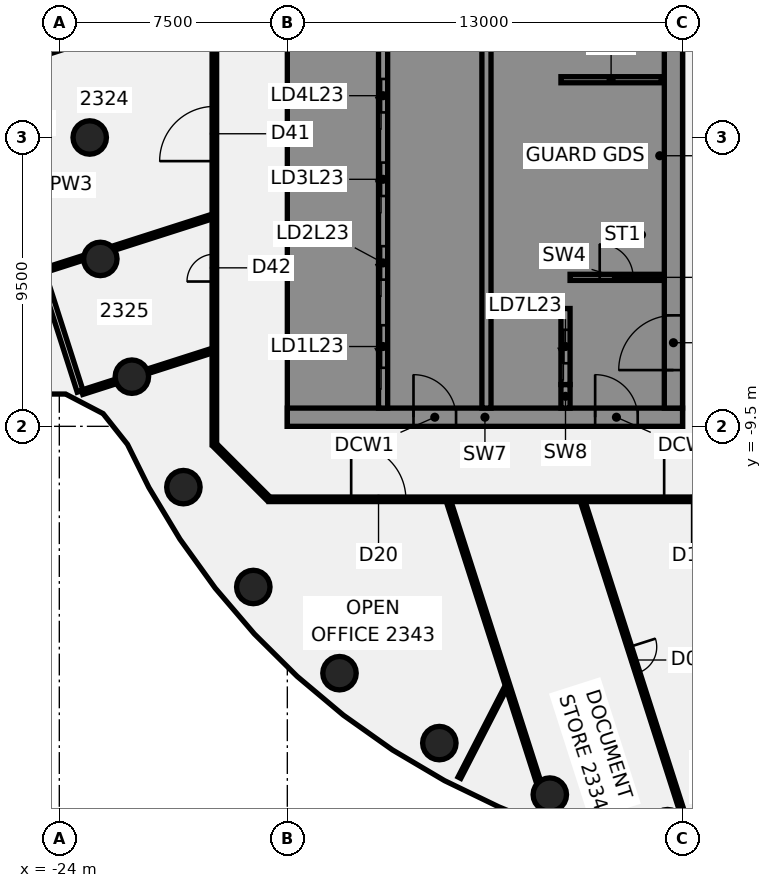
"""IFC4 building model, lengths in metres.
Left out: names, types, materials, properties, quantities, classifications, styles, units other than length and angle.
Written with IfcOpenShell. Run it as: python <this file> out.ifc"""

import sys

from ifc_helpers import new_model, si_unit, direction, frame, frame_2d, origin, origin_2d, place, context, subcontext, project, spatial, polyline, rectangle, circle, outline, extrude, element, fill, save


model = new_model("IFC4")
c1 = context("Model", 3, precision=1e-05, world=origin(), true_north=direction((0.0, 1.0)))
c2 = subcontext(c1, "Body", "Model", "MODEL_VIEW")
j1 = project(units=[si_unit("LENGTHUNIT", "METRE"), si_unit("PLANEANGLEUNIT", "RADIAN")], contexts=[c1])
p1 = place(None, origin())
s1 = spatial("IfcSite", under=j1, at=p1, CompositionType="ELEMENT")
p2 = place(p1, origin())
s2 = spatial("IfcBuilding", under=s1, at=p2, CompositionType="ELEMENT")
p3 = place(p2, frame((0.0, 0.0, 98.5)))
s3 = spatial("IfcBuildingStorey", under=s2, at=p3, CompositionType="ELEMENT", Elevation=98.5)
for number, where, z_axis, x_axis in (
    (1, (-23.0, 0.0, -0.14), (0.0, 0.0, 1.0), (1.0, 0.0, 0.0)),
    (2, (-22.651, -3.994, -0.14), (0.0, 0.0, 1.0), (1.0, 0.0, 0.0)),
    (3, (-21.613, -7.866, -0.14), (0.0, 0.0, 1.0), (1.0, 0.0, 0.0)),
    (4, (-19.919, -11.5, -0.14), (0.0, 0.0, 1.0), (1.0, 0.0, 0.0)),
    (5, (-17.619, -14.784, -0.14), (0.0, 0.0, 1.0), (1.0, 0.0, 0.0)),
    (6, (-14.784, -17.619, -0.14), (0.0, 0.0, 1.0), (1.0, 0.0, 0.0)),
    (7, (-11.5, -19.919, -0.14), (0.0, 0.0, 1.0), (1.0, 0.0, 0.0)),
    (8, (-7.866, -21.613, -0.14), (0.0, 0.0, 1.0), (1.0, 0.0, 0.0)),
):
    element("IfcColumn", number, at=place(p3, frame(where, z_axis=z_axis, x_axis=x_axis)), inside=s3, PredefinedType="COLUMN", context=c2, shape_type="SweptSolid", body=[
        extrude(circle(Radius=0.55, at=origin_2d()), origin(), (0.0, 0.0, 1.0), 3.75),
    ])
p4 = place(p3, frame((-27.663, 5.22, 0.0), z_axis=(0.0, 0.0, 1.0), x_axis=(0.305127633137, -0.952311465591, 0.0)))
e9 = element("IfcWall", 9, at=p4, inside=s3, PredefinedType="PARTITIONING", context=c2, shape_type="SweptSolid", body=[
    extrude(rectangle(XDim=14.247, YDim=0.2, at=frame_2d((7.124, 0.0))), origin(), (0.0, 0.0, 1.0), 3.01),
])
p5 = place(p4, frame((6.099, 0.0, 0.0)))
e10 = element("IfcOpeningElement", 10, at=p5, cuts=e9, PredefinedType="OPENING", context=c2, shape_type="SweptSolid", body=[
    extrude(rectangle(XDim=1.4, YDim=2.1, at=frame_2d((0.7, 1.05))), frame((0.0, 0.11, 0.0), z_axis=(0.0, -1.0, 0.0), x_axis=(1.0, 0.0, 0.0)), (0.0, 0.0, 1.0), 0.22),
])
p6 = place(p3, frame((-11.19, -11.981, 0.0), z_axis=(0.0, 0.0, 1.0), x_axis=(0.305161297435, -0.952300678645, 0.0)))
e11 = element("IfcWall", 11, at=p6, inside=s3, PredefinedType="PARTITIONING", context=c2, shape_type="SweptSolid", body=[
    extrude(rectangle(XDim=9.695, YDim=0.15, at=frame_2d((4.847, 0.0))), origin(), (0.0, 0.0, 1.0), 3.01),
])
p7 = place(p3, frame((-6.779, -11.981, 0.0), z_axis=(0.0, 0.0, 1.0), x_axis=(0.305006015104, -0.952350424345, 0.0)))
e12 = element("IfcWall", 12, at=p7, inside=s3, PredefinedType="PARTITIONING", context=c2, shape_type="SweptSolid", body=[
    extrude(rectangle(XDim=15.309, YDim=0.15, at=frame_2d((7.655, 0.0))), origin(), (0.0, 0.0, 1.0), 3.01),
])
p8 = place(p7, frame((5.015, 0.0, 0.0)))
e13 = element("IfcOpeningElement", 13, at=p8, cuts=e12, PredefinedType="OPENING", context=c2, shape_type="SweptSolid", body=[
    extrude(rectangle(XDim=0.9, YDim=2.1, at=frame_2d((0.45, 1.05))), frame((0.0, 0.085, 0.0), z_axis=(0.0, -1.0, 0.0), x_axis=(1.0, 0.0, 0.0)), (0.0, 0.0, 1.0), 0.17),
])
p9 = place(p3, frame((-18.872, -10.128, 0.0), z_axis=(0.0, 0.0, 1.0), x_axis=(0.707106781187, -0.707106781187, 0.0)))
e14 = element("IfcWall", 14, at=p9, inside=s3, PredefinedType="PARTITIONING", context=c2, shape_type="SweptSolid", body=[
    extrude(rectangle(XDim=2.465, YDim=0.15, at=frame_2d((1.232, 0.0))), origin(), (0.0, 0.0, 1.0), 3.01),
])
p10 = place(p3, frame((-17.1, -11.9, 0.0), z_axis=(0.0, 0.0, 1.0), x_axis=(1.0, 0.0, 0.0)))
e15 = element("IfcWall", 15, at=p10, inside=s3, PredefinedType="PARTITIONING", context=c2, shape_type="SweptSolid", body=[
    extrude(rectangle(XDim=34.165, YDim=0.15, at=frame_2d((17.083, 0.0))), origin(), (0.0, 0.0, 1.0), 3.01),
])
p11 = place(p10, frame((12.995, 0.0, 0.0)))
e16 = element("IfcOpeningElement", 16, at=p11, cuts=e15, PredefinedType="OPENING", context=c2, shape_type="SweptSolid", body=[
    extrude(rectangle(XDim=1.8, YDim=2.1, at=frame_2d((0.9, 1.05))), frame((0.0, 0.085, 0.0), z_axis=(0.0, -1.0, 0.0), x_axis=(1.0, 0.0, 0.0)), (0.0, 0.0, 1.0), 0.17),
])
p12 = place(p10, frame((2.7, 0.0, 0.0)))
e17 = element("IfcOpeningElement", 17, at=p12, cuts=e15, PredefinedType="OPENING", context=c2, shape_type="SweptSolid", body=[
    extrude(rectangle(XDim=1.8, YDim=2.1, at=frame_2d((0.9, 1.05))), frame((0.0, 0.085, 0.0), z_axis=(0.0, -1.0, 0.0), x_axis=(1.0, 0.0, 0.0)), (0.0, 0.0, 1.0), 0.17),
])
p13 = place(p10, frame((27.095, 0.0, 0.0)))
e18 = element("IfcOpeningElement", 18, at=p13, cuts=e15, PredefinedType="OPENING", context=c2, shape_type="SweptSolid", body=[
    extrude(rectangle(XDim=1.8, YDim=2.1, at=frame_2d((0.9, 1.05))), frame((0.0, 0.085, 0.0), z_axis=(0.0, -1.0, 0.0), x_axis=(1.0, 0.0, 0.0)), (0.0, 0.0, 1.0), 0.17),
])
p14 = place(p3, frame((-26.561, 2.11, 0.0), z_axis=(0.0, 0.0, 1.0), x_axis=(0.952353244945, 0.304997207926, 0.0)))
e19 = element("IfcWall", 19, at=p14, inside=s3, PredefinedType="PARTITIONING", context=c2, shape_type="SweptSolid", body=[
    extrude(rectangle(XDim=7.959, YDim=0.15, at=frame_2d((3.979, 0.0))), origin(), (0.0, 0.0, 1.0), 3.01),
])
p15 = place(p14, frame((2.45, 0.0, 0.0)))
e20 = element("IfcOpeningElement", 20, at=p15, cuts=e19, PredefinedType="OPENING", context=c2, shape_type="SweptSolid", body=[
    extrude(rectangle(XDim=0.9, YDim=2.1, at=frame_2d((0.45, 1.05))), frame((0.0, 0.085, 0.0), z_axis=(0.0, -1.0, 0.0), x_axis=(1.0, 0.0, 0.0)), (0.0, 0.0, 1.0), 0.17),
])
p16 = place(p3, frame((-24.482, -4.365, 0.0), z_axis=(0.0, 0.0, 1.0), x_axis=(0.952335663156, 0.305052101586, 0.0)))
e21 = element("IfcWall", 21, at=p16, inside=s3, PredefinedType="PARTITIONING", context=c2, shape_type="SweptSolid", body=[
    extrude(rectangle(XDim=1.346, YDim=0.15, at=frame_2d((0.673, 0.0))), origin(), (0.0, 0.0, 1.0), 3.01),
])
p17 = place(p3, frame((-22.235, -3.645, 0.0), z_axis=(0.0, 0.0, 1.0), x_axis=(0.952333666631, 0.305058334423, 0.0)))
e22 = element("IfcWall", 22, at=p17, inside=s3, PredefinedType="PARTITIONING", context=c2, shape_type="SweptSolid", body=[
    extrude(rectangle(XDim=3.417, YDim=0.15, at=frame_2d((1.708, 0.0))), origin(), (0.0, 0.0, 1.0), 3.01),
])
p18 = place(p3, frame((-23.251, -8.381, 0.0), z_axis=(0.0, 0.0, 1.0), x_axis=(0.952293891568, 0.305182476696, 0.0)))
e23 = element("IfcWall", 23, at=p18, inside=s3, PredefinedType="PARTITIONING", context=c2, shape_type="SweptSolid", body=[
    extrude(rectangle(XDim=1.176, YDim=0.15, at=frame_2d((0.588, 0.0))), origin(), (0.0, 0.0, 1.0), 3.01),
])
p19 = place(p3, frame((-21.1, -7.692, 0.0), z_axis=(0.0, 0.0, 1.0), x_axis=(0.952337472226, 0.30504645383, 0.0)))
e24 = element("IfcWall", 24, at=p19, inside=s3, PredefinedType="PARTITIONING", context=c2, shape_type="SweptSolid", body=[
    extrude(rectangle(XDim=2.225, YDim=0.15, at=frame_2d((1.112, 0.0))), origin(), (0.0, 0.0, 1.0), 3.01),
])
p20 = place(p3, frame((-10.838, -21.056, 0.0), z_axis=(0.0, 0.0, 1.0), x_axis=(0.457634850464, 0.889140227209, 0.0)))
e25 = element("IfcWall", 25, at=p20, inside=s3, PredefinedType="PARTITIONING", context=c2, shape_type="SweptSolid", body=[
    extrude(rectangle(XDim=3.308, YDim=0.1, at=frame_2d((1.654, 0.0))), origin(), (0.0, 0.0, 1.0), 3.01),
])
p21 = place(p3, frame((-18.9, -10.1, 0.0), z_axis=(0.0, 0.0, 1.0), x_axis=(0.0, 1.0, 0.0)))
e26 = element("IfcWall", 26, at=p21, inside=s3, PredefinedType="PARTITIONING", context=c2, shape_type="SweptSolid", body=[
    extrude(rectangle(XDim=20.2, YDim=0.15, at=frame_2d((10.1, 0.0))), origin(), (0.0, 0.0, 1.0), 3.01),
])
p22 = place(p21, frame((9.323, 0.0, 0.0)))
e27 = element("IfcOpeningElement", 27, at=p22, cuts=e26, PredefinedType="OPENING", context=c2, shape_type="SweptSolid", body=[
    extrude(rectangle(XDim=1.8, YDim=2.1, at=frame_2d((0.9, 1.05))), frame((0.0, 0.085, 0.0), z_axis=(0.0, -1.0, 0.0), x_axis=(1.0, 0.0, 0.0)), (0.0, 0.0, 1.0), 0.17),
])
p23 = place(p21, frame((5.363, 0.0, 0.0)))
e28 = element("IfcOpeningElement", 28, at=p23, cuts=e26, PredefinedType="OPENING", context=c2, shape_type="SweptSolid", body=[
    extrude(rectangle(XDim=0.9, YDim=2.1, at=frame_2d((0.45, 1.05))), frame((0.0, 0.085, 0.0), z_axis=(0.0, -1.0, 0.0), x_axis=(1.0, 0.0, 0.0)), (0.0, 0.0, 1.0), 0.17),
])
p24 = place(p3, frame((-16.5, -9.2, 0.0), z_axis=(0.0, 0.0, 1.0), x_axis=(1.0, 0.0, 0.0)))
e29 = element("IfcWall", 29, at=p24, inside=s3, PredefinedType="SHEAR", context=c2, shape_type="SweptSolid", body=[
    extrude(rectangle(XDim=13.0, YDim=0.6, at=frame_2d((6.5, 0.0))), origin(), (0.0, 0.0, 1.0), 3.61),
])
p25 = place(p24, frame((4.15, 0.0, 0.0)))
e30 = element("IfcOpeningElement", 30, at=p25, cuts=e29, PredefinedType="OPENING", context=c2, shape_type="SweptSolid", body=[
    extrude(rectangle(XDim=1.4, YDim=2.1, at=frame_2d((0.7, 1.05))), frame((0.0, 0.31, 0.0), z_axis=(0.0, -1.0, 0.0), x_axis=(1.0, 0.0, 0.0)), (0.0, 0.0, 1.0), 0.62),
])
p26 = place(p24, frame((10.125, 0.0, 0.0)))
e31 = element("IfcOpeningElement", 31, at=p26, cuts=e29, PredefinedType="OPENING", context=c2, shape_type="SweptSolid", body=[
    extrude(rectangle(XDim=1.4, YDim=2.1, at=frame_2d((0.7, 1.05))), frame((0.0, 0.31, 0.0), z_axis=(0.0, -1.0, 0.0), x_axis=(1.0, 0.0, 0.0)), (0.0, 0.0, 1.0), 0.62),
])
p27 = place(p3, origin())
e32 = element("IfcWall", 32, at=p27, inside=s3, PredefinedType="SHEAR", context=c2, shape_type="SweptSolid", body=[
    extrude(outline(polyline([(-13.5, -8.9), (-13.5, -8.125), (-15.9, -8.125), (-15.9, -5.625), (-13.5, -5.625), (-13.5, -5.375), (-15.9, -5.375), (-15.9, -2.875), (-13.5, -2.875), (-13.5, -2.625), (-15.9, -2.625), (-15.9, -0.125), (-13.5, -0.125), (-13.5, 0.125), (-15.9, 0.125), (-15.9, 2.625), (-13.5, 2.625), (-13.5, 2.875), (-15.9, 2.875), (-15.9, 5.375), (-13.5, 5.375), (-13.5, 5.625), (-15.9, 5.625), (-15.9, 8.125), (-13.5, 8.125), (-13.5, 8.9), (-15.9, 8.9), (-16.5, 8.9), (-16.5, -8.9), (-15.9, -8.9), (-13.5, -8.9)])), origin(), (0.0, 0.0, 1.0), 3.61),
])
p28 = place(p3, origin())
e33 = element("IfcWall", 33, at=p28, inside=s3, PredefinedType="SHEAR", context=c2, shape_type="SweptSolid", body=[
    extrude(outline(polyline([(-9.8, -5.375), (-9.8, -5.625), (-7.5, -5.625), (-7.2, -5.625), (-7.2, 8.9), (-7.5, 8.9), (-9.8, 8.9), (-9.8, 8.125), (-7.5, 8.125), (-7.5, 5.625), (-9.8, 5.625), (-9.8, 5.375), (-7.5, 5.375), (-7.5, 2.875), (-9.8, 2.875), (-9.8, 2.625), (-7.5, 2.625), (-7.5, 0.125), (-9.8, 0.125), (-9.8, -0.125), (-7.5, -0.125), (-7.5, -2.625), (-9.8, -2.625), (-9.8, -2.875), (-7.5, -2.875), (-7.5, -5.375), (-9.8, -5.375)])), origin(), (0.0, 0.0, 1.0), 3.61),
])
p29 = place(p3, origin())
e34 = element("IfcWall", 34, at=p29, inside=s3, PredefinedType="SHEAR", context=c2, shape_type="SweptSolid", body=[
    extrude(outline(polyline([(-7.5, -8.125), (-9.55, -8.125), (-9.55, -5.625), (-9.8, -5.625), (-9.8, -8.125), (-9.8, -8.9), (-7.5, -8.9), (-7.5, -8.125)])), origin(), (0.0, 0.0, 1.0), 3.61),
])
p30 = place(p3, frame((-7.35, -8.9, 0.0), z_axis=(0.0, 0.0, 1.0), x_axis=(0.0, 1.0, 0.0)))
e35 = element("IfcWall", 35, at=p30, inside=s3, PredefinedType="SHEAR", context=c2, shape_type="SweptSolid", body=[
    extrude(rectangle(XDim=0.775, YDim=0.3, at=frame_2d((0.387, 0.0))), origin(), (0.0, 0.0, 1.0), 3.61),
])
p31 = place(p3, frame((-7.5, 1.9, 0.0), z_axis=(0.0, 0.0, 1.0), x_axis=(1.0, 0.0, 0.0)))
e36 = element("IfcWall", 36, at=p31, inside=s3, PredefinedType="SHEAR", context=c2, shape_type="SweptSolid", body=[
    extrude(rectangle(XDim=3.3, YDim=0.2, at=frame_2d((1.65, 0.0))), origin(), (0.0, 0.0, 1.0), 3.61),
])
p32 = place(p3, frame((-13.35, -8.9, 0.0), z_axis=(0.0, 0.0, 1.0), x_axis=(0.0, 1.0, 0.0)))
e37 = element("IfcWall", 37, at=p32, inside=s3, PredefinedType="SHEAR", context=c2, shape_type="SweptSolid", body=[
    extrude(rectangle(XDim=17.8, YDim=0.3, at=frame_2d((8.9, 0.0))), origin(), (0.0, 0.0, 1.0), 3.61),
])
p33 = place(p32, frame((1.325, 0.0, 0.0)))
e38 = element("IfcOpeningElement", 38, at=p33, cuts=e37, PredefinedType="OPENING", context=c2, shape_type="SweptSolid", body=[
    extrude(rectangle(XDim=1.4, YDim=2.1, at=frame_2d((0.7, 1.05))), frame((0.0, 0.16, 0.0), z_axis=(0.0, -1.0, 0.0), x_axis=(1.0, 0.0, 0.0)), (0.0, 0.0, 1.0), 0.32),
])
p34 = place(p32, frame((4.225, 0.0, 0.0)))
e39 = element("IfcOpeningElement", 39, at=p34, cuts=e37, PredefinedType="OPENING", context=c2, shape_type="SweptSolid", body=[
    extrude(rectangle(XDim=1.1, YDim=2.1, at=frame_2d((0.55, 1.05))), frame((0.0, 0.16, 0.0), z_axis=(0.0, -1.0, 0.0), x_axis=(1.0, 0.0, 0.0)), (0.0, 0.0, 1.0), 0.32),
])
p35 = place(p32, frame((6.975, 0.0, 0.0)))
e40 = element("IfcOpeningElement", 40, at=p35, cuts=e37, PredefinedType="OPENING", context=c2, shape_type="SweptSolid", body=[
    extrude(rectangle(XDim=1.1, YDim=2.1, at=frame_2d((0.55, 1.05))), frame((0.0, 0.16, 0.0), z_axis=(0.0, -1.0, 0.0), x_axis=(1.0, 0.0, 0.0)), (0.0, 0.0, 1.0), 0.32),
])
p36 = place(p32, frame((9.725, 0.0, 0.0)))
e41 = element("IfcOpeningElement", 41, at=p36, cuts=e37, PredefinedType="OPENING", context=c2, shape_type="SweptSolid", body=[
    extrude(rectangle(XDim=1.1, YDim=2.1, at=frame_2d((0.55, 1.05))), frame((0.0, 0.16, 0.0), z_axis=(0.0, -1.0, 0.0), x_axis=(1.0, 0.0, 0.0)), (0.0, 0.0, 1.0), 0.32),
])
p37 = place(p32, frame((12.475, 0.0, 0.0)))
e42 = element("IfcOpeningElement", 42, at=p37, cuts=e37, PredefinedType="OPENING", context=c2, shape_type="SweptSolid", body=[
    extrude(rectangle(XDim=1.1, YDim=2.1, at=frame_2d((0.55, 1.05))), frame((0.0, 0.16, 0.0), z_axis=(0.0, -1.0, 0.0), x_axis=(1.0, 0.0, 0.0)), (0.0, 0.0, 1.0), 0.32),
])
p38 = place(p3, frame((-9.95, -8.9, 0.0), z_axis=(0.0, 0.0, 1.0), x_axis=(0.0, 1.0, 0.0)))
e43 = element("IfcWall", 43, at=p38, inside=s3, PredefinedType="SHEAR", context=c2, shape_type="SweptSolid", body=[
    extrude(rectangle(XDim=17.8, YDim=0.3, at=frame_2d((8.9, 0.0))), origin(), (0.0, 0.0, 1.0), 3.61),
])
p39 = place(p3, frame((-7.35, -8.125, 0.0), z_axis=(0.0, 0.0, 1.0), x_axis=(0.0, 1.0, 0.0)))
e44 = element("IfcWall", 44, at=p39, inside=s3, PredefinedType="SHEAR", context=c2, shape_type="SweptSolid", body=[
    extrude(rectangle(XDim=2.5, YDim=0.3, at=frame_2d((1.25, 0.0))), origin(), (0.0, 0.0, 1.0), 3.61),
])
p40 = place(p39, frame((0.7, 0.0, 0.0)))
e45 = element("IfcOpeningElement", 45, at=p40, cuts=e44, PredefinedType="OPENING", context=c2, shape_type="SweptSolid", body=[
    extrude(rectangle(XDim=1.1, YDim=2.1, at=frame_2d((0.55, 1.05))), frame((0.0, 0.16, 0.0), z_axis=(0.0, -1.0, 0.0), x_axis=(1.0, 0.0, 0.0)), (0.0, 0.0, 1.0), 0.32),
])
p41 = place(p3, frame((-3.8, -8.9, 0.0), z_axis=(0.0, 0.0, 1.0), x_axis=(0.0, 1.0, 0.0)))
e46 = element("IfcWall", 46, at=p41, inside=s3, PredefinedType="SHEAR", context=c2, shape_type="SweptSolid", body=[
    extrude(rectangle(XDim=17.8, YDim=0.6, at=frame_2d((8.9, 0.0))), origin(), (0.0, 0.0, 1.0), 3.61),
])
p42 = place(p41, frame((1.25, 0.0, 0.0)))
e47 = element("IfcOpeningElement", 47, at=p42, cuts=e46, PredefinedType="OPENING", context=c2, shape_type="SweptSolid", body=[
    extrude(rectangle(XDim=1.8, YDim=2.1, at=frame_2d((0.9, 1.05))), frame((0.0, 0.31, 0.0), z_axis=(0.0, -1.0, 0.0), x_axis=(1.0, 0.0, 0.0)), (0.0, 0.0, 1.0), 0.62),
])
p43 = place(p41, frame((13.8, 0.0, 0.0)))
e48 = element("IfcOpeningElement", 48, at=p43, cuts=e46, PredefinedType="OPENING", context=c2, shape_type="SweptSolid", body=[
    extrude(rectangle(XDim=1.0, YDim=2.1, at=frame_2d((0.5, 1.05))), frame((0.0, 0.31, 0.0), z_axis=(0.0, -1.0, 0.0), x_axis=(1.0, 0.0, 0.0)), (0.0, 0.0, 1.0), 0.62),
])
p44 = place(p3, frame((-7.2, -4.6, 0.0), z_axis=(0.0, 0.0, 1.0), x_axis=(1.0, 0.0, 0.0)))
e49 = element("IfcWall", 49, at=p44, inside=s3, PredefinedType="SHEAR", context=c2, shape_type="SweptSolid", body=[
    extrude(rectangle(XDim=3.1, YDim=0.2, at=frame_2d((1.55, 0.0))), origin(), (0.0, 0.0, 1.0), 3.61),
])
p45 = place(p44, frame((0.975, 0.0, 0.0)))
e50 = element("IfcOpeningElement", 50, at=p45, cuts=e49, PredefinedType="OPENING", context=c2, shape_type="SweptSolid", body=[
    extrude(rectangle(XDim=1.1, YDim=2.1, at=frame_2d((0.55, 1.05))), frame((0.0, 0.11, 0.0), z_axis=(0.0, -1.0, 0.0), x_axis=(1.0, 0.0, 0.0)), (0.0, 0.0, 1.0), 0.22),
])
p46 = place(p8, frame((0.9, 0.0, 0.0), z_axis=(0.0, 0.0, 1.0), x_axis=(-1.0, 0.0, 0.0)))
e51 = element("IfcDoor", 51, at=p46, inside=s3, OperationType="SINGLE_SWING_LEFT", PredefinedType="DOOR", context=c2, shape_type="SweptSolid", body=[
    extrude(rectangle(XDim=0.9, YDim=2.1, at=frame_2d((0.45, 1.05))), frame((0.0, 0.025, 0.0), z_axis=(0.0, -1.0, 0.0), x_axis=(1.0, 0.0, 0.0)), (0.0, 0.0, 1.0), 0.05),
])
fill(e13, e51)
p47 = place(p11, origin())
e52 = element("IfcDoor", 52, at=p47, inside=s3, OperationType="DOUBLE_DOOR_SINGLE_SWING", PredefinedType="DOOR", context=c2, shape_type="SweptSolid", body=[
    extrude(rectangle(XDim=1.8, YDim=2.1, at=frame_2d((0.9, 1.05))), frame((0.0, 0.025, 0.0), z_axis=(0.0, -1.0, 0.0), x_axis=(1.0, 0.0, 0.0)), (0.0, 0.0, 1.0), 0.05),
])
fill(e16, e52)
p48 = place(p12, frame((1.8, 0.0, 0.0), z_axis=(0.0, 0.0, 1.0), x_axis=(-1.0, 0.0, 0.0)))
e53 = element("IfcDoor", 53, at=p48, inside=s3, OperationType="DOUBLE_DOOR_SINGLE_SWING", PredefinedType="DOOR", context=c2, shape_type="SweptSolid", body=[
    extrude(rectangle(XDim=1.8, YDim=2.1, at=frame_2d((0.9, 1.05))), frame((0.0, 0.025, 0.0), z_axis=(0.0, -1.0, 0.0), x_axis=(1.0, 0.0, 0.0)), (0.0, 0.0, 1.0), 0.05),
])
fill(e17, e53)
p49 = place(p22, frame((1.8, 0.0, 0.0), z_axis=(0.0, 0.0, 1.0), x_axis=(-1.0, 0.0, 0.0)))
e54 = element("IfcDoor", 54, at=p49, inside=s3, OperationType="DOUBLE_DOOR_SINGLE_SWING", PredefinedType="DOOR", context=c2, shape_type="SweptSolid", body=[
    extrude(rectangle(XDim=1.8, YDim=2.1, at=frame_2d((0.9, 1.05))), frame((0.0, 0.025, 0.0), z_axis=(0.0, -1.0, 0.0), x_axis=(1.0, 0.0, 0.0)), (0.0, 0.0, 1.0), 0.05),
])
fill(e27, e54)
p50 = place(p23, origin())
e55 = element("IfcDoor", 55, at=p50, inside=s3, OperationType="SINGLE_SWING_RIGHT", PredefinedType="DOOR", context=c2, shape_type="SweptSolid", body=[
    extrude(rectangle(XDim=0.9, YDim=2.1, at=frame_2d((0.45, 1.05))), frame((0.0, 0.025, 0.0), z_axis=(0.0, -1.0, 0.0), x_axis=(1.0, 0.0, 0.0)), (0.0, 0.0, 1.0), 0.05),
])
fill(e28, e55)
p51 = place(p25, origin())
e56 = element("IfcDoor", 56, at=p51, inside=s3, OperationType="SINGLE_SWING_LEFT", PredefinedType="DOOR", context=c2, shape_type="SweptSolid", body=[
    extrude(rectangle(XDim=1.4, YDim=2.1, at=frame_2d((0.7, 1.05))), frame((0.0, 0.025, 0.0), z_axis=(0.0, -1.0, 0.0), x_axis=(1.0, 0.0, 0.0)), (0.0, 0.0, 1.0), 0.05),
])
fill(e30, e56)
p52 = place(p26, origin())
e57 = element("IfcDoor", 57, at=p52, inside=s3, OperationType="SINGLE_SWING_LEFT", PredefinedType="DOOR", context=c2, shape_type="SweptSolid", body=[
    extrude(rectangle(XDim=1.4, YDim=2.1, at=frame_2d((0.7, 1.05))), frame((0.0, 0.025, 0.0), z_axis=(0.0, -1.0, 0.0), x_axis=(1.0, 0.0, 0.0)), (0.0, 0.0, 1.0), 0.05),
])
fill(e31, e57)
p53 = place(p42, origin())
e58 = element("IfcDoor", 58, at=p53, inside=s3, OperationType="SINGLE_SWING_LEFT", PredefinedType="DOOR", context=c2, shape_type="SweptSolid", body=[
    extrude(rectangle(XDim=1.8, YDim=2.1, at=frame_2d((0.9, 1.05))), frame((0.0, 0.025, 0.0), z_axis=(0.0, -1.0, 0.0), x_axis=(1.0, 0.0, 0.0)), (0.0, 0.0, 1.0), 0.05),
])
fill(e47, e58)
p54 = place(p45, origin())
e59 = element("IfcDoor", 59, at=p54, inside=s3, OperationType="SINGLE_SWING_LEFT", PredefinedType="DOOR", context=c2, shape_type="SweptSolid", body=[
    extrude(rectangle(XDim=1.1, YDim=2.1, at=frame_2d((0.55, 1.05))), frame((0.0, 0.025, 0.0), z_axis=(0.0, -1.0, 0.0), x_axis=(1.0, 0.0, 0.0)), (0.0, 0.0, 1.0), 0.05),
])
fill(e50, e59)
p55 = place(p33, origin())
e60 = element("IfcDoor", 60, at=p55, inside=s3, OperationType="SLIDING_TO_LEFT", PredefinedType="DOOR", context=c2, shape_type="SweptSolid", body=[
    extrude(rectangle(XDim=1.4, YDim=2.1, at=frame_2d((0.7, 1.05))), frame((0.0, 0.025, 0.0), z_axis=(0.0, -1.0, 0.0), x_axis=(1.0, 0.0, 0.0)), (0.0, 0.0, 1.0), 0.05),
])
fill(e38, e60)
p56 = place(p34, origin())
e61 = element("IfcDoor", 61, at=p56, inside=s3, OperationType="SLIDING_TO_LEFT", PredefinedType="DOOR", context=c2, shape_type="SweptSolid", body=[
    extrude(rectangle(XDim=1.1, YDim=2.1, at=frame_2d((0.55, 1.05))), frame((0.0, 0.025, 0.0), z_axis=(0.0, -1.0, 0.0), x_axis=(1.0, 0.0, 0.0)), (0.0, 0.0, 1.0), 0.05),
])
fill(e39, e61)
p57 = place(p35, origin())
e62 = element("IfcDoor", 62, at=p57, inside=s3, OperationType="SLIDING_TO_LEFT", PredefinedType="DOOR", context=c2, shape_type="SweptSolid", body=[
    extrude(rectangle(XDim=1.1, YDim=2.1, at=frame_2d((0.55, 1.05))), frame((0.0, 0.025, 0.0), z_axis=(0.0, -1.0, 0.0), x_axis=(1.0, 0.0, 0.0)), (0.0, 0.0, 1.0), 0.05),
])
fill(e40, e62)
p58 = place(p36, origin())
e63 = element("IfcDoor", 63, at=p58, inside=s3, OperationType="SLIDING_TO_LEFT", PredefinedType="DOOR", context=c2, shape_type="SweptSolid", body=[
    extrude(rectangle(XDim=1.1, YDim=2.1, at=frame_2d((0.55, 1.05))), frame((0.0, 0.025, 0.0), z_axis=(0.0, -1.0, 0.0), x_axis=(1.0, 0.0, 0.0)), (0.0, 0.0, 1.0), 0.05),
])
fill(e41, e63)
p59 = place(p40, origin())
e64 = element("IfcDoor", 64, at=p59, inside=s3, OperationType="SLIDING_TO_LEFT", PredefinedType="DOOR", context=c2, shape_type="SweptSolid", body=[
    extrude(rectangle(XDim=1.1, YDim=2.1, at=frame_2d((0.55, 1.05))), frame((0.0, 0.025, 0.0), z_axis=(0.0, -1.0, 0.0), x_axis=(1.0, 0.0, 0.0)), (0.0, 0.0, 1.0), 0.05),
])
fill(e45, e64)
save(model, sys.argv[1])
